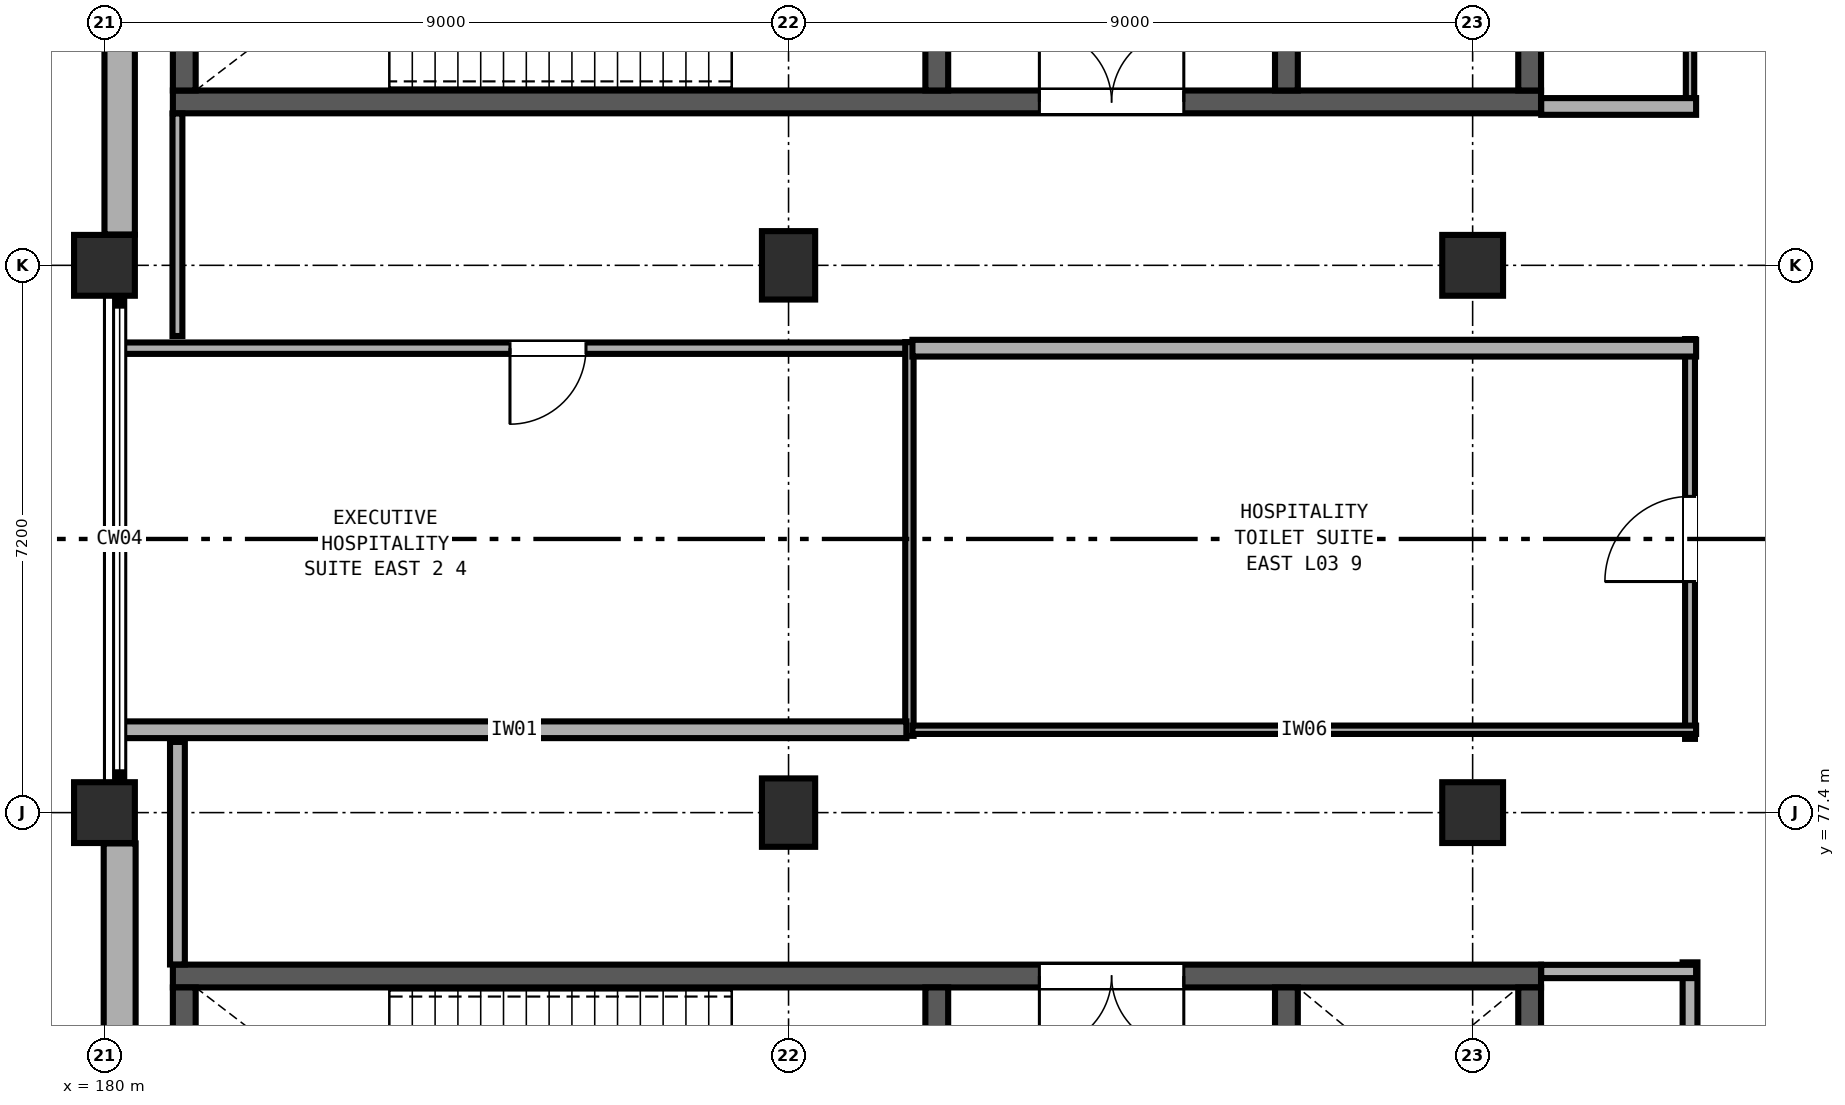
"""IFC4 building model, lengths in metres.
Left out: names, types, materials, properties, quantities, classifications, styles, units other than length and angle.
Written with IfcOpenShell. Run it as: python <this file> out.ifc"""

import sys

from ifc_helpers import new_model, si_unit, direction, frame, frame_2d, origin, origin_2d, place, context, subcontext, project, spatial, rectangle, extrude, element, fill, save


model = new_model("IFC4")
c1 = context("Model", 3, precision=1e-05, world=origin(), true_north=direction((0.0, 1.0)))
c2 = subcontext(c1, "Body", "Model", "MODEL_VIEW")
j1 = project(units=[si_unit("LENGTHUNIT", "METRE"), si_unit("PLANEANGLEUNIT", "RADIAN")], contexts=[c1])
p1 = place(None, origin())
s1 = spatial("IfcSite", under=j1, at=p1, CompositionType="ELEMENT")
p2 = place(p1, origin())
s2 = spatial("IfcBuilding", under=s1, at=p2, CompositionType="ELEMENT")
p3 = place(p2, frame((0.0, 0.0, 14.4)))
s3 = spatial("IfcBuildingStorey", under=s2, at=p3, CompositionType="ELEMENT", Elevation=14.4)
for number, where, z_axis, x_axis in (
    (1, (180.0, 77.4, 0.0), (0.0, 0.0, 1.0), (1.0, 0.0, 0.0)),
    (2, (180.0, 84.6, 0.0), (0.0, 0.0, 1.0), (1.0, 0.0, 0.0)),
):
    element("IfcColumn", number, at=place(p3, frame(where, z_axis=z_axis, x_axis=x_axis)), inside=s3, PredefinedType="COLUMN", context=c2, shape_type="SweptSolid", body=[
        extrude(rectangle(XDim=0.8, YDim=0.8, at=origin_2d()), origin(), (0.0, 0.0, 1.0), 4.8),
    ])
for number, where, z_axis, x_axis in (
    (3, (189.0, 77.4, 0.0), (0.0, 0.0, 1.0), (1.0, 0.0, 0.0)),
    (4, (189.0, 84.6, 0.0), (0.0, 0.0, 1.0), (1.0, 0.0, 0.0)),
):
    element("IfcColumn", number, at=place(p3, frame(where, z_axis=z_axis, x_axis=x_axis)), inside=s3, PredefinedType="COLUMN", context=c2, shape_type="SweptSolid", body=[
        extrude(rectangle(XDim=0.7, YDim=0.9, at=origin_2d()), origin(), (0.0, 0.0, 1.0), 4.8),
    ])
for number, where, z_axis, x_axis in (
    (5, (198.0, 77.4, 0.0), (0.0, 0.0, 1.0), (1.0, 0.0, 0.0)),
    (6, (198.0, 84.6, 0.0), (0.0, 0.0, 1.0), (1.0, 0.0, 0.0)),
):
    element("IfcColumn", number, at=place(p3, frame(where, z_axis=z_axis, x_axis=x_axis)), inside=s3, PredefinedType="COLUMN", context=c2, shape_type="SweptSolid", body=[
        extrude(rectangle(XDim=0.8, YDim=0.8, at=origin_2d()), origin(), (0.0, 0.0, 1.0), 4.8),
    ])
p4 = place(p3, frame((198.9, 75.25, 0.0), z_axis=(0.0, 0.0, 1.0), x_axis=(-1.0, 0.0, 0.0)))
e7 = element("IfcWall", 7, at=p4, inside=s3, PredefinedType="SHEAR", context=c2, shape_type="SweptSolid", body=[
    extrude(rectangle(XDim=18.0, YDim=0.3, at=frame_2d((9.0, 0.0))), origin(), (0.0, 0.0, 1.0), 4.48),
])
p5 = place(p4, frame((4.7, 0.0, 0.0)))
e8 = element("IfcOpeningElement", 8, at=p5, cuts=e7, PredefinedType="OPENING", context=c2, shape_type="SweptSolid", body=[
    extrude(rectangle(XDim=1.9, YDim=2.25, at=frame_2d((0.95, 1.125))), frame((0.0, 0.16, 0.0), z_axis=(0.0, -1.0, 0.0), x_axis=(1.0, 0.0, 0.0)), (0.0, 0.0, 1.0), 0.32),
])
for number, where, z_axis, x_axis in (
    (9, (181.05, 75.1, 0.0), (0.0, 0.0, 1.0), (0.0, -1.0, 0.0)),
    (10, (198.75, 69.7, 0.0), (0.0, 0.0, 1.0), (0.0, 1.0, 0.0)),
):
    element("IfcWall", number, at=place(p3, frame(where, z_axis=z_axis, x_axis=x_axis)), inside=s3, PredefinedType="SHEAR", context=c2, shape_type="SweptSolid", body=[
        extrude(rectangle(XDim=5.4, YDim=0.3, at=frame_2d((2.7, 0.0))), origin(), (0.0, 0.0, 1.0), 4.48),
    ])
p6 = place(p3, frame((190.95, 69.7, 0.0), z_axis=(0.0, 0.0, 1.0), x_axis=(0.0, 1.0, 0.0)))
e11 = element("IfcWall", 11, at=p6, inside=s3, PredefinedType="SHEAR", context=c2, shape_type="SweptSolid", body=[
    extrude(rectangle(XDim=5.4, YDim=0.3, at=frame_2d((2.7, 0.0))), origin(), (0.0, 0.0, 1.0), 4.48),
])
p7 = place(p6, frame((1.75, 0.0, 0.0)))
e12 = element("IfcOpeningElement", 12, at=p7, cuts=e11, PredefinedType="OPENING", context=c2, shape_type="SweptSolid", body=[
    extrude(rectangle(XDim=1.8, YDim=2.25, at=frame_2d((0.9, 1.125))), frame((0.0, 0.16, 0.0), z_axis=(0.0, -1.0, 0.0), x_axis=(1.0, 0.0, 0.0)), (0.0, 0.0, 1.0), 0.32),
])
p8 = place(p3, frame((195.55, 72.55, 0.0), z_axis=(0.0, 0.0, 1.0), x_axis=(0.0, 1.0, 0.0)))
e13 = element("IfcWall", 13, at=p8, inside=s3, PredefinedType="SHEAR", context=c2, shape_type="SweptSolid", body=[
    extrude(rectangle(XDim=2.55, YDim=0.3, at=frame_2d((1.275, 0.0))), origin(), (0.0, 0.0, 1.0), 4.48),
])
p9 = place(p8, frame((0.725, 0.0, 0.0)))
e14 = element("IfcOpeningElement", 14, at=p9, cuts=e13, PredefinedType="OPENING", context=c2, shape_type="SweptSolid", body=[
    extrude(rectangle(XDim=0.9, YDim=2.1, at=frame_2d((0.45, 1.05))), frame((0.0, 0.16, 0.0), z_axis=(0.0, -1.0, 0.0), x_axis=(1.0, 0.0, 0.0)), (0.0, 0.0, 1.0), 0.32),
])
p10 = place(p3, frame((180.9, 86.75, 0.0), z_axis=(0.0, 0.0, 1.0), x_axis=(1.0, 0.0, 0.0)))
e15 = element("IfcWall", 15, at=p10, inside=s3, PredefinedType="SHEAR", context=c2, shape_type="SweptSolid", body=[
    extrude(rectangle(XDim=18.0, YDim=0.3, at=frame_2d((9.0, 0.0))), origin(), (0.0, 0.0, 1.0), 4.48),
])
p11 = place(p10, frame((11.4, 0.0, 0.0)))
e16 = element("IfcOpeningElement", 16, at=p11, cuts=e15, PredefinedType="OPENING", context=c2, shape_type="SweptSolid", body=[
    extrude(rectangle(XDim=1.9, YDim=2.25, at=frame_2d((0.95, 1.125))), frame((0.0, 0.16, 0.0), z_axis=(0.0, -1.0, 0.0), x_axis=(1.0, 0.0, 0.0)), (0.0, 0.0, 1.0), 0.32),
])
for number, where, z_axis, x_axis in (
    (17, (181.05, 92.3, 0.0), (0.0, 0.0, 1.0), (0.0, -1.0, 0.0)),
    (18, (198.75, 86.9, 0.0), (0.0, 0.0, 1.0), (0.0, 1.0, 0.0)),
):
    element("IfcWall", number, at=place(p3, frame(where, z_axis=z_axis, x_axis=x_axis)), inside=s3, PredefinedType="SHEAR", context=c2, shape_type="SweptSolid", body=[
        extrude(rectangle(XDim=5.4, YDim=0.3, at=frame_2d((2.7, 0.0))), origin(), (0.0, 0.0, 1.0), 4.48),
    ])
p12 = place(p3, frame((190.95, 86.9, 0.0), z_axis=(0.0, 0.0, 1.0), x_axis=(0.0, 1.0, 0.0)))
e19 = element("IfcWall", 19, at=p12, inside=s3, PredefinedType="SHEAR", context=c2, shape_type="SweptSolid", body=[
    extrude(rectangle(XDim=5.4, YDim=0.3, at=frame_2d((2.7, 0.0))), origin(), (0.0, 0.0, 1.0), 4.48),
])
p13 = place(p12, frame((1.75, 0.0, 0.0)))
e20 = element("IfcOpeningElement", 20, at=p13, cuts=e19, PredefinedType="OPENING", context=c2, shape_type="SweptSolid", body=[
    extrude(rectangle(XDim=1.8, YDim=2.25, at=frame_2d((0.9, 1.125))), frame((0.0, 0.16, 0.0), z_axis=(0.0, -1.0, 0.0), x_axis=(1.0, 0.0, 0.0)), (0.0, 0.0, 1.0), 0.32),
])
p14 = place(p3, frame((195.55, 86.9, 0.0), z_axis=(0.0, 0.0, 1.0), x_axis=(0.0, 1.0, 0.0)))
e21 = element("IfcWall", 21, at=p14, inside=s3, PredefinedType="SHEAR", context=c2, shape_type="SweptSolid", body=[
    extrude(rectangle(XDim=2.85, YDim=0.3, at=frame_2d((1.425, 0.0))), origin(), (0.0, 0.0, 1.0), 4.48),
])
p15 = place(p3, frame((180.2, 68.805, 0.0), z_axis=(0.0, 0.0, 1.0), x_axis=(0.0, 1.0, 0.0)))
e22 = element("IfcWall", 22, at=p15, inside=s3, PredefinedType="SOLIDWALL", context=c2, shape_type="SweptSolid", body=[
    extrude(rectangle(XDim=8.19, YDim=0.42, at=frame_2d((4.095, 0.0))), origin(), (0.0, 0.0, 1.0), 3.58),
])
p16 = place(p3, frame((180.2, 85.005, 0.0), z_axis=(0.0, 0.0, 1.0), x_axis=(0.0, 1.0, 0.0)))
e23 = element("IfcWall", 23, at=p16, inside=s3, PredefinedType="SOLIDWALL", context=c2, shape_type="SweptSolid", body=[
    extrude(rectangle(XDim=8.19, YDim=0.4, at=frame_2d((4.095, 0.0))), origin(), (0.0, 0.0, 1.0), 3.58),
])
p17 = place(p3, frame((200.86, 99.79, 0.0), z_axis=(0.0, 0.0, 1.0), x_axis=(0.0, -1.0, 0.0)))
e24 = element("IfcWall", 24, at=p17, inside=s3, PredefinedType="PARTITIONING", context=c2, shape_type="SweptSolid", body=[
    extrude(rectangle(XDim=13.18, YDim=0.11, at=frame_2d((6.59, 0.0))), origin(), (0.0, 0.0, 1.0), 3.56),
])
p18 = place(p3, frame((200.94, 86.69, 0.0), z_axis=(0.0, 0.0, 1.0), x_axis=(-1.0, 0.0, 0.0)))
e25 = element("IfcWall", 25, at=p18, inside=s3, PredefinedType="PARTITIONING", context=c2, shape_type="SweptSolid", body=[
    extrude(rectangle(XDim=2.038, YDim=0.22, at=frame_2d((1.019, 0.0))), origin(), (0.0, 0.0, 1.0), 3.56),
])
p19 = place(p3, frame((200.86, 62.17, 0.0), z_axis=(0.0, 0.0, 1.0), x_axis=(0.0, 1.0, 0.0)))
e26 = element("IfcWall", 26, at=p19, inside=s3, PredefinedType="PARTITIONING", context=c2, shape_type="SweptSolid", body=[
    extrude(rectangle(XDim=13.26, YDim=0.195, at=frame_2d((6.63, 0.0))), origin(), (0.0, 0.0, 1.0), 3.56),
])
p20 = place(p19, frame((6.07, 0.0, 0.0)))
e27 = element("IfcOpeningElement", 27, at=p20, cuts=e26, PredefinedType="OPENING", context=c2, shape_type="SweptSolid", body=[
    extrude(rectangle(XDim=1.12, YDim=2.22, at=frame_2d((0.56, 1.11))), frame((0.0, 0.107, 0.0), z_axis=(0.0, -1.0, 0.0), x_axis=(1.0, 0.0, 0.0)), (0.0, 0.0, 1.0), 0.215),
])
p21 = place(p3, frame((198.902, 75.31, 0.0), z_axis=(0.0, 0.0, 1.0), x_axis=(1.0, 0.0, 0.0)))
e28 = element("IfcWall", 28, at=p21, inside=s3, PredefinedType="PARTITIONING", context=c2, shape_type="SweptSolid", body=[
    extrude(rectangle(XDim=2.038, YDim=0.175, at=frame_2d((1.019, 0.0))), origin(), (0.0, 0.0, 1.0), 3.56),
])
p22 = place(p3, frame((190.59, 83.51, 0.0), z_axis=(0.0, 0.0, 1.0), x_axis=(-1.0, 0.0, 0.0)))
e29 = element("IfcWall", 29, at=p22, inside=s3, PredefinedType="PARTITIONING", context=c2, shape_type="SweptSolid", body=[
    extrude(rectangle(XDim=10.357, YDim=0.15, at=frame_2d((5.179, 0.0))), origin(), (0.0, 0.0, 1.0), 3.56),
])
p23 = place(p22, frame((4.255, 0.0, 0.0)))
e30 = element("IfcOpeningElement", 30, at=p23, cuts=e29, PredefinedType="OPENING", context=c2, shape_type="SweptSolid", body=[
    extrude(rectangle(XDim=1.0, YDim=2.1, at=frame_2d((0.5, 1.05))), frame((0.0, 0.085, 0.0), z_axis=(0.0, -1.0, 0.0), x_axis=(1.0, 0.0, 0.0)), (0.0, 0.0, 1.0), 0.17),
])
p24 = place(p3, frame((180.96, 86.598, 0.0), z_axis=(0.0, 0.0, 1.0), x_axis=(0.0, -1.0, 0.0)))
e31 = element("IfcWall", 31, at=p24, inside=s3, PredefinedType="PARTITIONING", context=c2, shape_type="SweptSolid", body=[
    extrude(rectangle(XDim=2.928, YDim=0.13, at=frame_2d((1.464, 0.0))), origin(), (0.0, 0.0, 1.0), 3.56),
])
p25 = place(p3, frame((190.59, 83.59, 0.0), z_axis=(0.0, 0.0, 1.0), x_axis=(0.0, -1.0, 0.0)))
e32 = element("IfcWall", 32, at=p25, inside=s3, PredefinedType="PARTITIONING", context=c2, shape_type="SweptSolid", body=[
    extrude(rectangle(XDim=5.18, YDim=0.11, at=frame_2d((2.59, 0.0))), origin(), (0.0, 0.0, 1.0), 3.56),
])
p26 = place(p3, frame((190.55, 78.49, 0.0), z_axis=(0.0, 0.0, 1.0), x_axis=(-1.0, 0.0, 0.0)))
e33 = element("IfcWall", 33, at=p26, inside=s3, PredefinedType="PARTITIONING", context=c2, shape_type="SweptSolid", body=[
    extrude(rectangle(XDim=10.317, YDim=0.22, at=frame_2d((5.159, 0.0))), origin(), (0.0, 0.0, 1.0), 3.56),
])
p27 = place(p3, frame((180.96, 78.33, 0.0), z_axis=(0.0, 0.0, 1.0), x_axis=(0.0, -1.0, 0.0)))
e34 = element("IfcWall", 34, at=p27, inside=s3, PredefinedType="PARTITIONING", context=c2, shape_type="SweptSolid", body=[
    extrude(rectangle(XDim=2.928, YDim=0.195, at=frame_2d((1.464, 0.0))), origin(), (0.0, 0.0, 1.0), 3.56),
])
p28 = place(p3, frame((200.86, 78.37, 0.0), z_axis=(0.0, 0.0, 1.0), x_axis=(0.0, 1.0, 0.0)))
e35 = element("IfcWall", 35, at=p28, inside=s3, PredefinedType="PARTITIONING", context=c2, shape_type="SweptSolid", body=[
    extrude(rectangle(XDim=5.26, YDim=0.13, at=frame_2d((2.63, 0.0))), origin(), (0.0, 0.0, 1.0), 3.56),
])
p29 = place(p28, frame((2.07, 0.0, 0.0)))
e36 = element("IfcOpeningElement", 36, at=p29, cuts=e35, PredefinedType="OPENING", context=c2, shape_type="SweptSolid", body=[
    extrude(rectangle(XDim=1.12, YDim=2.22, at=frame_2d((0.56, 1.11))), frame((0.0, 0.075, 0.0), z_axis=(0.0, -1.0, 0.0), x_axis=(1.0, 0.0, 0.0)), (0.0, 0.0, 1.0), 0.15),
])
p30 = place(p3, frame((200.94, 78.49, 0.0), z_axis=(0.0, 0.0, 1.0), x_axis=(-1.0, 0.0, 0.0)))
e37 = element("IfcWall", 37, at=p30, inside=s3, PredefinedType="PARTITIONING", context=c2, shape_type="SweptSolid", body=[
    extrude(rectangle(XDim=10.31, YDim=0.11, at=frame_2d((5.155, 0.0))), origin(), (0.0, 0.0, 1.0), 3.56),
])
p31 = place(p3, frame((190.63, 83.51, 0.0), z_axis=(0.0, 0.0, 1.0), x_axis=(1.0, 0.0, 0.0)))
e38 = element("IfcWall", 38, at=p31, inside=s3, PredefinedType="PARTITIONING", context=c2, shape_type="SweptSolid", body=[
    extrude(rectangle(XDim=10.31, YDim=0.22, at=frame_2d((5.155, 0.0))), origin(), (0.0, 0.0, 1.0), 3.56),
])
p32 = place(p5, origin())
e39 = element("IfcDoor", 39, at=p32, inside=s3, OperationType="DOUBLE_DOOR_SINGLE_SWING", PredefinedType="DOOR", context=c2, shape_type="SweptSolid", body=[
    extrude(rectangle(XDim=1.9, YDim=2.25, at=frame_2d((0.95, 1.125))), frame((0.0, 0.025, 0.0), z_axis=(0.0, -1.0, 0.0), x_axis=(1.0, 0.0, 0.0)), (0.0, 0.0, 1.0), 0.05),
])
fill(e8, e39)
p33 = place(p11, origin())
e40 = element("IfcDoor", 40, at=p33, inside=s3, OperationType="DOUBLE_DOOR_SINGLE_SWING", PredefinedType="DOOR", context=c2, shape_type="SweptSolid", body=[
    extrude(rectangle(XDim=1.9, YDim=2.25, at=frame_2d((0.95, 1.125))), frame((0.0, 0.025, 0.0), z_axis=(0.0, -1.0, 0.0), x_axis=(1.0, 0.0, 0.0)), (0.0, 0.0, 1.0), 0.05),
])
fill(e16, e40)
p34 = place(p23, origin())
e41 = element("IfcDoor", 41, at=p34, inside=s3, OperationType="SINGLE_SWING_RIGHT", PredefinedType="DOOR", context=c2, shape_type="SweptSolid", body=[
    extrude(rectangle(XDim=1.0, YDim=2.1, at=frame_2d((0.5, 1.05))), frame((0.0, 0.025, 0.0), z_axis=(0.0, -1.0, 0.0), x_axis=(1.0, 0.0, 0.0)), (0.0, 0.0, 1.0), 0.05),
])
fill(e30, e41)
p35 = place(p29, origin())
e42 = element("IfcDoor", 42, at=p35, inside=s3, OperationType="SINGLE_SWING_LEFT", PredefinedType="DOOR", context=c2, shape_type="SweptSolid", body=[
    extrude(rectangle(XDim=1.12, YDim=2.22, at=frame_2d((0.56, 1.11))), frame((0.0, 0.025, 0.0), z_axis=(0.0, -1.0, 0.0), x_axis=(1.0, 0.0, 0.0)), (0.0, 0.0, 1.0), 0.05),
])
fill(e36, e42)
save(model, sys.argv[1])
